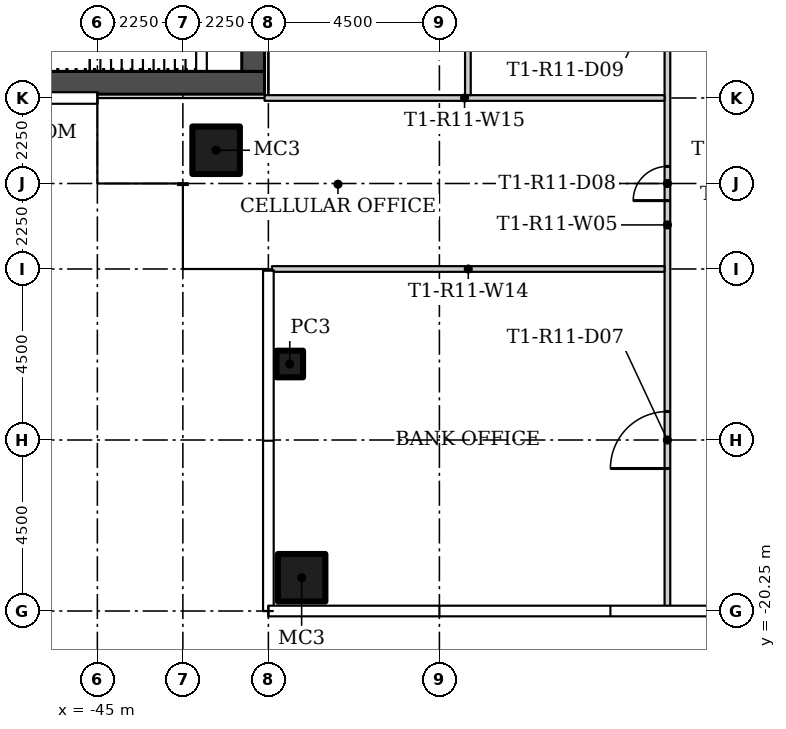
"""IFC4 building model, lengths in metres.
Left out: names, types, materials, properties, quantities, classifications, styles, units other than length and angle.
Written with IfcOpenShell. Run it as: python <this file> out.ifc"""

import sys

from ifc_helpers import new_model, si_unit, direction, frame, frame_2d, origin, origin_2d, place, context, subcontext, project, spatial, rectangle, hollow_rectangle, extrude, element, fill, save


model = new_model("IFC4")
c1 = context("Model", 3, precision=1e-05, world=origin(), true_north=direction((0.0, 1.0)))
c2 = subcontext(c1, "Body", "Model", "MODEL_VIEW")
j1 = project(units=[si_unit("LENGTHUNIT", "METRE"), si_unit("PLANEANGLEUNIT", "RADIAN")], contexts=[c1])
p1 = place(None, origin())
s1 = spatial("IfcSite", under=j1, at=p1, CompositionType="ELEMENT")
p2 = place(p1, origin())
s2 = spatial("IfcBuilding", under=s1, at=p2, CompositionType="ELEMENT")
p3 = place(p2, frame((0.0, 0.0, 109.2)))
s3 = spatial("IfcBuildingStorey", under=s2, at=p3, CompositionType="ELEMENT", Elevation=109.2)
p4 = place(p3, frame((-41.875, -8.125, 0.0)))
e1 = element("IfcColumn", 1, at=p4, inside=s3, PredefinedType="COLUMN", context=c2, shape_type="SweptSolid", body=[
    extrude(hollow_rectangle(XDim=1.25, YDim=1.25, WallThickness=0.05, at=origin_2d()), origin(), (0.0, 0.0, 1.0), 3.55),
])
p5 = place(p3, frame((-39.938, -13.75, 0.0)))
e2 = element("IfcColumn", 2, at=p5, inside=s3, PredefinedType="COLUMN", context=c2, shape_type="SweptSolid", body=[
    extrude(hollow_rectangle(XDim=0.7, YDim=0.7, WallThickness=0.025, at=origin_2d()), origin(), (0.0, 0.0, 1.0), 3.55),
])
p6 = place(p3, frame((-39.625, -19.375, 0.0)))
e3 = element("IfcColumn", 3, at=p6, inside=s3, PredefinedType="COLUMN", context=c2, shape_type="SweptSolid", body=[
    extrude(hollow_rectangle(XDim=1.25, YDim=1.25, WallThickness=0.05, at=origin_2d()), origin(), (0.0, 0.0, 1.0), 3.55),
])
p7 = place(p3, frame((-30.0, -20.155, 0.0), z_axis=(0.0, 0.0, 1.0), x_axis=(0.0, 1.0, 0.0)))
e4 = element("IfcWall", 4, at=p7, inside=s3, PredefinedType="PARTITIONING", context=c2, shape_type="SweptSolid", body=[
    extrude(rectangle(XDim=20.13, YDim=0.15, at=frame_2d((10.065, 0.0))), origin(), (0.0, 0.0, 1.0), 3.55),
])
p8 = place(p7, frame((3.655, 0.0, 0.0)))
e5 = element("IfcOpeningElement", 5, at=p8, cuts=e4, PredefinedType="OPENING", context=c2, shape_type="SweptSolid", body=[
    extrude(rectangle(XDim=1.5, YDim=2.1, at=frame_2d((0.75, 1.05))), frame((0.0, 0.085, 0.0), z_axis=(0.0, -1.0, 0.0), x_axis=(1.0, 0.0, 0.0)), (0.0, 0.0, 1.0), 0.17),
])
p9 = place(p7, frame((10.705, 0.0, 0.0)))
e6 = element("IfcOpeningElement", 6, at=p9, cuts=e4, PredefinedType="OPENING", context=c2, shape_type="SweptSolid", body=[
    extrude(rectangle(XDim=0.9, YDim=2.1, at=frame_2d((0.45, 1.05))), frame((0.0, 0.085, 0.0), z_axis=(0.0, -1.0, 0.0), x_axis=(1.0, 0.0, 0.0)), (0.0, 0.0, 1.0), 0.17),
])
p10 = place(p7, frame((16.055, 0.0, 0.0)))
e7 = element("IfcOpeningElement", 7, at=p10, cuts=e4, PredefinedType="OPENING", context=c2, shape_type="SweptSolid", body=[
    extrude(rectangle(XDim=1.5, YDim=2.1, at=frame_2d((0.75, 1.05))), frame((0.0, 0.085, 0.0), z_axis=(0.0, -1.0, 0.0), x_axis=(1.0, 0.0, 0.0)), (0.0, 0.0, 1.0), 0.17),
])
p11 = place(p3, frame((-40.405, -11.25, 0.0)))
e8 = element("IfcWall", 8, at=p11, inside=s3, PredefinedType="PARTITIONING", context=c2, shape_type="SweptSolid", body=[
    extrude(rectangle(XDim=10.33, YDim=0.15, at=frame_2d((5.165, 0.0))), origin(), (0.0, 0.0, 1.0), 3.55),
])
p12 = place(p3, frame((-30.075, -6.75, 0.0), z_axis=(0.0, 0.0, 1.0), x_axis=(-1.0, 0.0, 0.0)))
e9 = element("IfcWall", 9, at=p12, inside=s3, PredefinedType="PARTITIONING", context=c2, shape_type="SweptSolid", body=[
    extrude(rectangle(XDim=10.525, YDim=0.15, at=frame_2d((5.263, 0.0))), origin(), (0.0, 0.0, 1.0), 3.55),
])
p13 = place(p3, frame((-35.25, -6.675, 0.0), z_axis=(0.0, 0.0, 1.0), x_axis=(0.0, 1.0, 0.0)))
e10 = element("IfcWall", 10, at=p13, inside=s3, PredefinedType="PARTITIONING", context=c2, shape_type="SweptSolid", body=[
    extrude(rectangle(XDim=6.65, YDim=0.15, at=frame_2d((3.325, 0.0))), origin(), (0.0, 0.0, 1.0), 3.55),
])
p14 = place(p3, frame((-40.6, -6.35, 0.0), z_axis=(0.0, 0.0, 1.0), x_axis=(-1.0, 0.0, 0.0)))
e11 = element("IfcWall", 11, at=p14, inside=s3, PredefinedType="SHEAR", context=c2, shape_type="SweptSolid", body=[
    extrude(rectangle(XDim=13.3, YDim=0.6, at=frame_2d((6.65, 0.0))), origin(), (0.0, 0.0, 1.0), 3.55),
])
p15 = place(p3, frame((-40.9, -6.05, 0.0), z_axis=(0.0, 0.0, 1.0), x_axis=(0.0, 1.0, 0.0)))
e12 = element("IfcWall", 12, at=p15, inside=s3, PredefinedType="SHEAR", context=c2, shape_type="SweptSolid", body=[
    extrude(rectangle(XDim=12.1, YDim=0.6, at=frame_2d((6.05, 0.0))), origin(), (0.0, 0.0, 1.0), 3.55),
])
p16 = place(p15, frame((6.4, 0.0, 0.0)))
e13 = element("IfcOpeningElement", 13, at=p16, cuts=e12, PredefinedType="OPENING", context=c2, shape_type="SweptSolid", body=[
    extrude(rectangle(XDim=1.8, YDim=2.4, at=frame_2d((0.9, 1.2))), frame((0.0, 0.31, 0.0), z_axis=(0.0, -1.0, 0.0), x_axis=(1.0, 0.0, 0.0)), (0.0, 0.0, 1.0), 0.62),
])
p17 = place(p8, origin())
e14 = element("IfcDoor", 14, at=p17, inside=s3, OperationType="DOUBLE_DOOR_SINGLE_SWING", PredefinedType="DOOR", context=c2, shape_type="SweptSolid", body=[
    extrude(rectangle(XDim=1.5, YDim=2.1, at=frame_2d((0.75, 1.05))), frame((0.0, 0.025, 0.0), z_axis=(0.0, -1.0, 0.0), x_axis=(1.0, 0.0, 0.0)), (0.0, 0.0, 1.0), 0.05),
])
fill(e5, e14)
p18 = place(p9, origin())
e15 = element("IfcDoor", 15, at=p18, inside=s3, OperationType="SINGLE_SWING_RIGHT", PredefinedType="DOOR", context=c2, shape_type="SweptSolid", body=[
    extrude(rectangle(XDim=0.9, YDim=2.1, at=frame_2d((0.45, 1.05))), frame((0.0, 0.025, 0.0), z_axis=(0.0, -1.0, 0.0), x_axis=(1.0, 0.0, 0.0)), (0.0, 0.0, 1.0), 0.05),
])
fill(e6, e15)
save(model, sys.argv[1])
